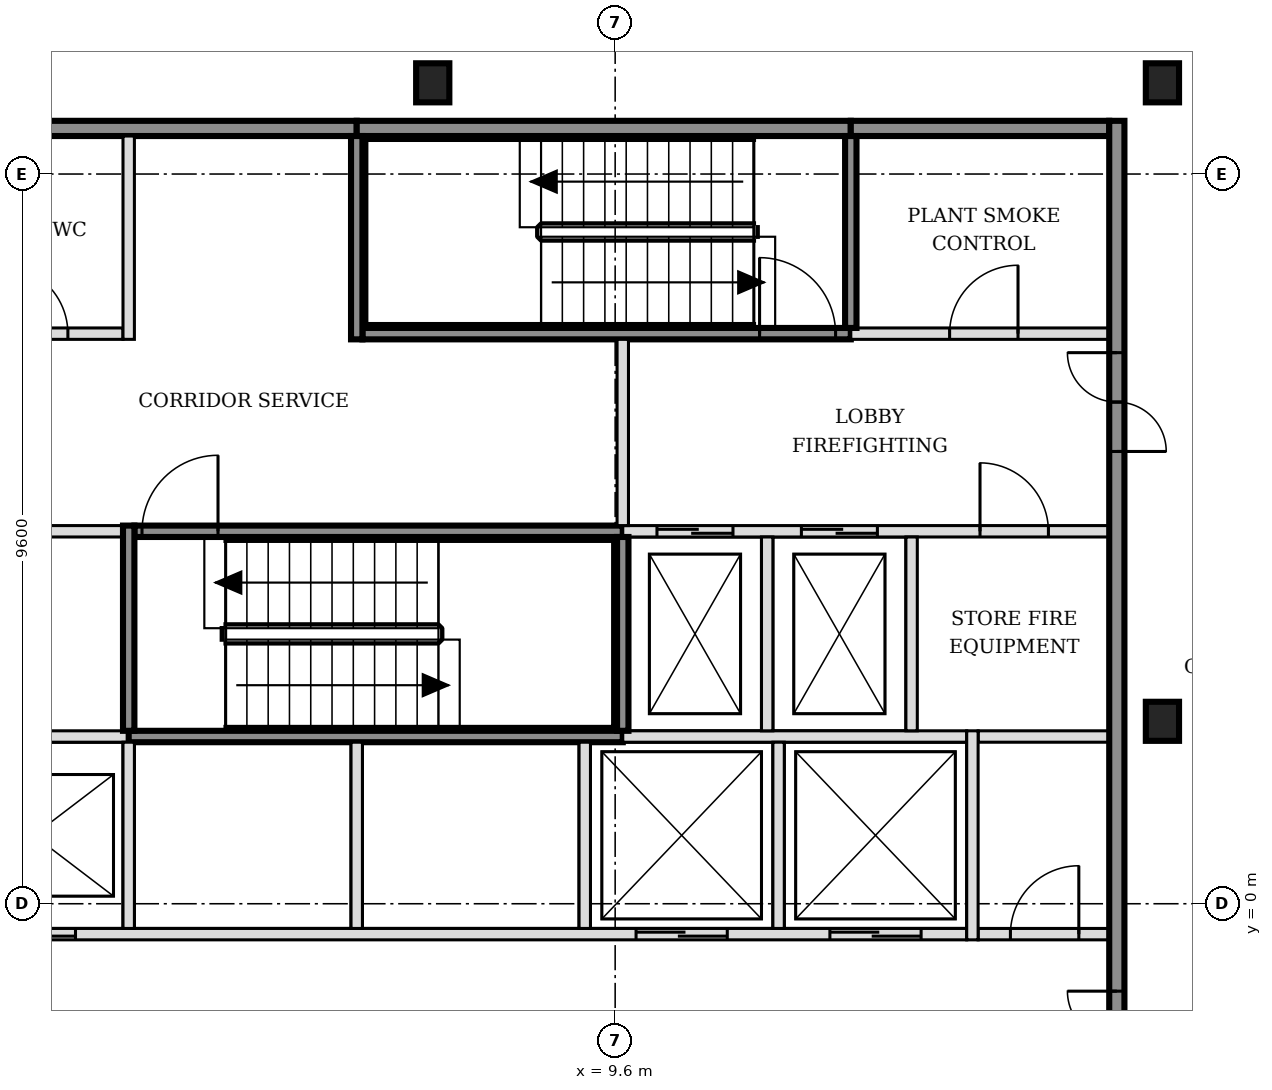
"""IFC4 building model, lengths in metres.
Left out: names, types, materials, properties, quantities, classifications, styles, units other than length and angle.
Written with IfcOpenShell. Run it as: python <this file> out.ifc"""

import sys

from ifc_helpers import new_model, si_unit, direction, frame, frame_2d, origin, origin_2d, place, context, subcontext, project, spatial, rectangle, i_section, extrude, element, fill, save


model = new_model("IFC4")
c1 = context("Model", 3, precision=1e-05, world=origin(), true_north=direction((0.0, 1.0)))
c2 = subcontext(c1, "Body", "Model", "MODEL_VIEW")
j1 = project(units=[si_unit("LENGTHUNIT", "METRE"), si_unit("PLANEANGLEUNIT", "RADIAN")], contexts=[c1])
p1 = place(None, origin())
s1 = spatial("IfcSite", under=j1, at=p1, CompositionType="ELEMENT")
p2 = place(p1, origin())
s2 = spatial("IfcBuilding", under=s1, at=p2, CompositionType="ELEMENT")
p3 = place(p2, frame((0.0, 0.0, 87.0)))
s3 = spatial("IfcBuildingStorey", under=s2, at=p3, CompositionType="ELEMENT", Elevation=87.0)
for number, where, z_axis, x_axis in (
    (1, (16.8, 2.4, -0.15), (0.0, 0.0, 1.0), (1.0, 0.0, 0.0)),
    (2, (7.2, 10.8, -0.15), (0.0, 0.0, 1.0), (1.0, 0.0, 0.0)),
    (3, (16.8, 10.8, -0.15), (0.0, 0.0, 1.0), (1.0, 0.0, 0.0)),
):
    element("IfcColumn", number, at=place(p3, frame(where, z_axis=z_axis, x_axis=x_axis)), inside=s3, PredefinedType="COLUMN", context=c2, shape_type="SweptSolid", body=[
        extrude(i_section(OverallWidth=0.437, OverallDepth=0.514, WebThickness=0.061, FlangeThickness=0.097, FilletRadius=0.015, at=origin_2d()), origin(), (0.0, 0.0, 1.0), 3.6),
    ])
p4 = place(p3, frame((-1.7, -0.4, 0.0), z_axis=(0.0, 0.0, 1.0), x_axis=(1.0, 0.0, 0.0)))
e4 = element("IfcWall", 4, at=p4, inside=s3, PredefinedType="SOLIDWALL", context=c2, shape_type="SweptSolid", body=[
    extrude(rectangle(XDim=15.925, YDim=0.15, at=frame_2d((7.962, 0.0))), origin(), (0.0, 0.0, 1.0), 3.45),
])
p5 = place(p4, frame((0.6, 0.0, 0.0)))
e5 = element("IfcOpeningElement", 5, at=p5, cuts=e4, PredefinedType="OPENING", context=c2, shape_type="SweptSolid", body=[
    extrude(rectangle(XDim=1.1, YDim=2.1, at=frame_2d((0.55, 1.05))), frame((0.0, 0.085, 0.0), z_axis=(0.0, -1.0, 0.0), x_axis=(1.0, 0.0, 0.0)), (0.0, 0.0, 1.0), 0.17),
])
p6 = place(p4, frame((3.1, 0.0, 0.0)))
e6 = element("IfcOpeningElement", 6, at=p6, cuts=e4, PredefinedType="OPENING", context=c2, shape_type="SweptSolid", body=[
    extrude(rectangle(XDim=1.1, YDim=2.1, at=frame_2d((0.55, 1.05))), frame((0.0, 0.085, 0.0), z_axis=(0.0, -1.0, 0.0), x_axis=(1.0, 0.0, 0.0)), (0.0, 0.0, 1.0), 0.17),
])
p7 = place(p4, frame((11.575, 0.0, 0.0)))
e7 = element("IfcOpeningElement", 7, at=p7, cuts=e4, PredefinedType="OPENING", context=c2, shape_type="SweptSolid", body=[
    extrude(rectangle(XDim=1.2, YDim=2.1, at=frame_2d((0.6, 1.05))), frame((0.0, 0.085, 0.0), z_axis=(0.0, -1.0, 0.0), x_axis=(1.0, 0.0, 0.0)), (0.0, 0.0, 1.0), 0.17),
])
p8 = place(p4, frame((14.125, 0.0, 0.0)))
e8 = element("IfcOpeningElement", 8, at=p8, cuts=e4, PredefinedType="OPENING", context=c2, shape_type="SweptSolid", body=[
    extrude(rectangle(XDim=1.2, YDim=2.1, at=frame_2d((0.6, 1.05))), frame((0.0, 0.085, 0.0), z_axis=(0.0, -1.0, 0.0), x_axis=(1.0, 0.0, 0.0)), (0.0, 0.0, 1.0), 0.17),
])
p9 = place(p3, frame((14.375, -0.4, 0.0), z_axis=(0.0, 0.0, 1.0), x_axis=(1.0, 0.0, 0.0)))
e9 = element("IfcWall", 9, at=p9, inside=s3, PredefinedType="PARTITIONING", context=c2, shape_type="SweptSolid", body=[
    extrude(rectangle(XDim=1.725, YDim=0.15, at=frame_2d((0.863, 0.0))), origin(), (0.0, 0.0, 1.0), 3.45),
])
p10 = place(p9, frame((0.425, 0.0, 0.0)))
e10 = element("IfcOpeningElement", 10, at=p10, cuts=e9, PredefinedType="OPENING", context=c2, shape_type="SweptSolid", body=[
    extrude(rectangle(XDim=0.9, YDim=2.1, at=frame_2d((0.45, 1.05))), frame((0.0, 0.085, 0.0), z_axis=(0.0, -1.0, 0.0), x_axis=(1.0, 0.0, 0.0)), (0.0, 0.0, 1.0), 0.17),
])
p11 = place(p3, frame((-1.7, 2.2, 0.0), z_axis=(0.0, 0.0, 1.0), x_axis=(1.0, 0.0, 0.0)))
e11 = element("IfcWall", 11, at=p11, inside=s3, PredefinedType="SOLIDWALL", context=c2, shape_type="SweptSolid", body=[
    extrude(rectangle(XDim=4.9, YDim=0.15, at=frame_2d((2.45, 0.0))), origin(), (0.0, 0.0, 1.0), 3.45),
])
p12 = place(p3, frame((3.2, 2.2, 0.0), z_axis=(0.0, 0.0, 1.0), x_axis=(1.0, 0.0, 0.0)))
e12 = element("IfcWall", 12, at=p12, inside=s3, PredefinedType="SOLIDWALL", context=c2, shape_type="SweptSolid", body=[
    extrude(rectangle(XDim=6.5, YDim=0.15, at=frame_2d((3.25, 0.0))), origin(), (0.0, 0.0, 1.0), 3.45),
])
p13 = place(p3, frame((9.7, 2.2, 0.0), z_axis=(0.0, 0.0, 1.0), x_axis=(1.0, 0.0, 0.0)))
e13 = element("IfcWall", 13, at=p13, inside=s3, PredefinedType="SOLIDWALL", context=c2, shape_type="SweptSolid", body=[
    extrude(rectangle(XDim=4.525, YDim=0.15, at=frame_2d((2.263, 0.0))), origin(), (0.0, 0.0, 1.0), 3.45),
])
p14 = place(p3, frame((14.375, 2.2, 0.0), z_axis=(0.0, 0.0, 1.0), x_axis=(1.0, 0.0, 0.0)))
e14 = element("IfcWall", 14, at=p14, inside=s3, PredefinedType="PARTITIONING", context=c2, shape_type="SweptSolid", body=[
    extrude(rectangle(XDim=1.725, YDim=0.15, at=frame_2d((0.863, 0.0))), origin(), (0.0, 0.0, 1.0), 3.45),
])
p15 = place(p3, frame((-1.7, 4.9, 0.0), z_axis=(0.0, 0.0, 1.0), x_axis=(1.0, 0.0, 0.0)))
e15 = element("IfcWall", 15, at=p15, inside=s3, PredefinedType="PARTITIONING", context=c2, shape_type="SweptSolid", body=[
    extrude(rectangle(XDim=4.825, YDim=0.15, at=frame_2d((2.413, 0.0))), origin(), (0.0, 0.0, 1.0), 3.45),
])
p16 = place(p15, frame((1.95, 0.0, 0.0)))
e16 = element("IfcOpeningElement", 16, at=p16, cuts=e15, PredefinedType="OPENING", context=c2, shape_type="SweptSolid", body=[
    extrude(rectangle(XDim=0.9, YDim=2.1, at=frame_2d((0.45, 1.05))), frame((0.0, 0.085, 0.0), z_axis=(0.0, -1.0, 0.0), x_axis=(1.0, 0.0, 0.0)), (0.0, 0.0, 1.0), 0.17),
])
p17 = place(p3, frame((3.275, 4.9, 0.0), z_axis=(0.0, 0.0, 1.0), x_axis=(1.0, 0.0, 0.0)))
e17 = element("IfcWall", 17, at=p17, inside=s3, PredefinedType="SOLIDWALL", context=c2, shape_type="SweptSolid", body=[
    extrude(rectangle(XDim=6.425, YDim=0.15, at=frame_2d((3.212, 0.0))), origin(), (0.0, 0.0, 1.0), 3.45),
])
p18 = place(p17, frame((0.1, 0.0, 0.0)))
e18 = element("IfcOpeningElement", 18, at=p18, cuts=e17, PredefinedType="OPENING", context=c2, shape_type="SweptSolid", body=[
    extrude(rectangle(XDim=1.0, YDim=2.1, at=frame_2d((0.5, 1.05))), frame((0.0, 0.085, 0.0), z_axis=(0.0, -1.0, 0.0), x_axis=(1.0, 0.0, 0.0)), (0.0, 0.0, 1.0), 0.17),
])
p19 = place(p3, frame((9.7, 4.9, 0.0), z_axis=(0.0, 0.0, 1.0), x_axis=(1.0, 0.0, 0.0)))
e19 = element("IfcWall", 19, at=p19, inside=s3, PredefinedType="SOLIDWALL", context=c2, shape_type="SweptSolid", body=[
    extrude(rectangle(XDim=6.4, YDim=0.15, at=frame_2d((3.2, 0.0))), origin(), (0.0, 0.0, 1.0), 3.45),
])
p20 = place(p19, frame((0.45, 0.0, 0.0)))
e20 = element("IfcOpeningElement", 20, at=p20, cuts=e19, PredefinedType="OPENING", context=c2, shape_type="SweptSolid", body=[
    extrude(rectangle(XDim=1.0, YDim=2.1, at=frame_2d((0.5, 1.05))), frame((0.0, 0.085, 0.0), z_axis=(0.0, -1.0, 0.0), x_axis=(1.0, 0.0, 0.0)), (0.0, 0.0, 1.0), 0.17),
])
p21 = place(p19, frame((2.35, 0.0, 0.0)))
e21 = element("IfcOpeningElement", 21, at=p21, cuts=e19, PredefinedType="OPENING", context=c2, shape_type="SweptSolid", body=[
    extrude(rectangle(XDim=1.0, YDim=2.1, at=frame_2d((0.5, 1.05))), frame((0.0, 0.085, 0.0), z_axis=(0.0, -1.0, 0.0), x_axis=(1.0, 0.0, 0.0)), (0.0, 0.0, 1.0), 0.17),
])
p22 = place(p19, frame((4.7, 0.0, 0.0)))
e22 = element("IfcOpeningElement", 22, at=p22, cuts=e19, PredefinedType="OPENING", context=c2, shape_type="SweptSolid", body=[
    extrude(rectangle(XDim=0.9, YDim=2.1, at=frame_2d((0.45, 1.05))), frame((0.0, 0.085, 0.0), z_axis=(0.0, -1.0, 0.0), x_axis=(1.0, 0.0, 0.0)), (0.0, 0.0, 1.0), 0.17),
])
p23 = place(p3, frame((-1.7, 7.5, 0.0), z_axis=(0.0, 0.0, 1.0), x_axis=(1.0, 0.0, 0.0)))
e23 = element("IfcWall", 23, at=p23, inside=s3, PredefinedType="PARTITIONING", context=c2, shape_type="SweptSolid", body=[
    extrude(rectangle(XDim=4.825, YDim=0.15, at=frame_2d((2.413, 0.0))), origin(), (0.0, 0.0, 1.0), 3.45),
])
p24 = place(p23, frame((0.7, 0.0, 0.0)))
e24 = element("IfcOpeningElement", 24, at=p24, cuts=e23, PredefinedType="OPENING", context=c2, shape_type="SweptSolid", body=[
    extrude(rectangle(XDim=0.9, YDim=2.1, at=frame_2d((0.45, 1.05))), frame((0.0, 0.085, 0.0), z_axis=(0.0, -1.0, 0.0), x_axis=(1.0, 0.0, 0.0)), (0.0, 0.0, 1.0), 0.17),
])
p25 = place(p23, frame((3.2, 0.0, 0.0)))
e25 = element("IfcOpeningElement", 25, at=p25, cuts=e23, PredefinedType="OPENING", context=c2, shape_type="SweptSolid", body=[
    extrude(rectangle(XDim=0.9, YDim=2.1, at=frame_2d((0.45, 1.05))), frame((0.0, 0.085, 0.0), z_axis=(0.0, -1.0, 0.0), x_axis=(1.0, 0.0, 0.0)), (0.0, 0.0, 1.0), 0.17),
])
p26 = place(p3, frame((6.275, 7.5, 0.0), z_axis=(0.0, 0.0, 1.0), x_axis=(1.0, 0.0, 0.0)))
e26 = element("IfcWall", 26, at=p26, inside=s3, PredefinedType="SOLIDWALL", context=c2, shape_type="SweptSolid", body=[
    extrude(rectangle(XDim=6.425, YDim=0.15, at=frame_2d((3.212, 0.0))), origin(), (0.0, 0.0, 1.0), 3.45),
])
p27 = place(p26, frame((5.225, 0.0, 0.0)))
e27 = element("IfcOpeningElement", 27, at=p27, cuts=e26, PredefinedType="OPENING", context=c2, shape_type="SweptSolid", body=[
    extrude(rectangle(XDim=1.0, YDim=2.1, at=frame_2d((0.5, 1.05))), frame((0.0, 0.085, 0.0), z_axis=(0.0, -1.0, 0.0), x_axis=(1.0, 0.0, 0.0)), (0.0, 0.0, 1.0), 0.17),
])
p28 = place(p3, frame((12.7, 7.5, 0.0), z_axis=(0.0, 0.0, 1.0), x_axis=(1.0, 0.0, 0.0)))
e28 = element("IfcWall", 28, at=p28, inside=s3, PredefinedType="SOLIDWALL", context=c2, shape_type="SweptSolid", body=[
    extrude(rectangle(XDim=3.4, YDim=0.15, at=frame_2d((1.7, 0.0))), origin(), (0.0, 0.0, 1.0), 3.45),
])
p29 = place(p28, frame((1.3, 0.0, 0.0)))
e29 = element("IfcOpeningElement", 29, at=p29, cuts=e28, PredefinedType="OPENING", context=c2, shape_type="SweptSolid", body=[
    extrude(rectangle(XDim=0.9, YDim=2.1, at=frame_2d((0.45, 1.05))), frame((0.0, 0.085, 0.0), z_axis=(0.0, -1.0, 0.0), x_axis=(1.0, 0.0, 0.0)), (0.0, 0.0, 1.0), 0.17),
])
p30 = place(p3, frame((-1.7, 10.2, 0.0), z_axis=(0.0, 0.0, 1.0), x_axis=(1.0, 0.0, 0.0)))
e30 = element("IfcWall", 30, at=p30, inside=s3, PredefinedType="SOLIDWALL", context=c2, shape_type="SweptSolid", body=[
    extrude(rectangle(XDim=7.9, YDim=0.2, at=frame_2d((3.95, 0.0))), origin(), (0.0, 0.0, 1.0), 3.45),
])
p31 = place(p3, frame((6.2, 10.2, 0.0), z_axis=(0.0, 0.0, 1.0), x_axis=(1.0, 0.0, 0.0)))
e31 = element("IfcWall", 31, at=p31, inside=s3, PredefinedType="SOLIDWALL", context=c2, shape_type="SweptSolid", body=[
    extrude(rectangle(XDim=6.5, YDim=0.2, at=frame_2d((3.25, 0.0))), origin(), (0.0, 0.0, 1.0), 3.45),
])
p32 = place(p3, frame((12.7, 10.2, 0.0), z_axis=(0.0, 0.0, 1.0), x_axis=(1.0, 0.0, 0.0)))
e32 = element("IfcWall", 32, at=p32, inside=s3, PredefinedType="SOLIDWALL", context=c2, shape_type="SweptSolid", body=[
    extrude(rectangle(XDim=3.4, YDim=0.2, at=frame_2d((1.7, 0.0))), origin(), (0.0, 0.0, 1.0), 3.45),
])
p33 = place(p3, frame((3.2, -0.325, 0.0), z_axis=(0.0, 0.0, 1.0), x_axis=(0.0, 1.0, 0.0)))
e33 = element("IfcWall", 33, at=p33, inside=s3, PredefinedType="SOLIDWALL", context=c2, shape_type="SweptSolid", body=[
    extrude(rectangle(XDim=2.45, YDim=0.15, at=frame_2d((1.225, 0.0))), origin(), (0.0, 0.0, 1.0), 3.45),
])
p34 = place(p3, frame((3.2, 2.275, 0.0), z_axis=(0.0, 0.0, 1.0), x_axis=(0.0, 1.0, 0.0)))
e34 = element("IfcWall", 34, at=p34, inside=s3, PredefinedType="SOLIDWALL", context=c2, shape_type="SweptSolid", body=[
    extrude(rectangle(XDim=2.7, YDim=0.15, at=frame_2d((1.35, 0.0))), origin(), (0.0, 0.0, 1.0), 3.45),
])
p35 = place(p3, frame((3.2, 7.425, 0.0), z_axis=(0.0, 0.0, 1.0), x_axis=(0.0, 1.0, 0.0)))
e35 = element("IfcWall", 35, at=p35, inside=s3, PredefinedType="PARTITIONING", context=c2, shape_type="SweptSolid", body=[
    extrude(rectangle(XDim=2.675, YDim=0.15, at=frame_2d((1.337, 0.0))), origin(), (0.0, 0.0, 1.0), 3.45),
])
p36 = place(p3, frame((6.2, -0.325, 0.0), z_axis=(0.0, 0.0, 1.0), x_axis=(0.0, 1.0, 0.0)))
e36 = element("IfcWall", 36, at=p36, inside=s3, PredefinedType="SOLIDWALL", context=c2, shape_type="SweptSolid", body=[
    extrude(rectangle(XDim=2.45, YDim=0.15, at=frame_2d((1.225, 0.0))), origin(), (0.0, 0.0, 1.0), 3.45),
])
p37 = place(p3, frame((6.2, 7.425, 0.0), z_axis=(0.0, 0.0, 1.0), x_axis=(0.0, 1.0, 0.0)))
e37 = element("IfcWall", 37, at=p37, inside=s3, PredefinedType="SOLIDWALL", context=c2, shape_type="SweptSolid", body=[
    extrude(rectangle(XDim=2.675, YDim=0.15, at=frame_2d((1.337, 0.0))), origin(), (0.0, 0.0, 1.0), 3.45),
])
p38 = place(p3, frame((9.2, -0.325, 0.0), z_axis=(0.0, 0.0, 1.0), x_axis=(0.0, 1.0, 0.0)))
e38 = element("IfcWall", 38, at=p38, inside=s3, PredefinedType="SOLIDWALL", context=c2, shape_type="SweptSolid", body=[
    extrude(rectangle(XDim=2.45, YDim=0.15, at=frame_2d((1.225, 0.0))), origin(), (0.0, 0.0, 1.0), 3.45),
])
p39 = place(p3, frame((9.7, 2.275, 0.0), z_axis=(0.0, 0.0, 1.0), x_axis=(0.0, 1.0, 0.0)))
e39 = element("IfcWall", 39, at=p39, inside=s3, PredefinedType="SOLIDWALL", context=c2, shape_type="SweptSolid", body=[
    extrude(rectangle(XDim=2.55, YDim=0.15, at=frame_2d((1.275, 0.0))), origin(), (0.0, 0.0, 1.0), 3.45),
])
p40 = place(p3, frame((9.7, 4.975, 0.0), z_axis=(0.0, 0.0, 1.0), x_axis=(0.0, 1.0, 0.0)))
e40 = element("IfcWall", 40, at=p40, inside=s3, PredefinedType="SOLIDWALL", context=c2, shape_type="SweptSolid", body=[
    extrude(rectangle(XDim=2.45, YDim=0.15, at=frame_2d((1.225, 0.0))), origin(), (0.0, 0.0, 1.0), 3.45),
])
p41 = place(p3, frame((11.6, 2.275, 0.0), z_axis=(0.0, 0.0, 1.0), x_axis=(0.0, 1.0, 0.0)))
e41 = element("IfcWall", 41, at=p41, inside=s3, PredefinedType="SOLIDWALL", context=c2, shape_type="SweptSolid", body=[
    extrude(rectangle(XDim=2.55, YDim=0.15, at=frame_2d((1.275, 0.0))), origin(), (0.0, 0.0, 1.0), 3.45),
])
p42 = place(p3, frame((11.75, -0.325, 0.0), z_axis=(0.0, 0.0, 1.0), x_axis=(0.0, 1.0, 0.0)))
e42 = element("IfcWall", 42, at=p42, inside=s3, PredefinedType="SOLIDWALL", context=c2, shape_type="SweptSolid", body=[
    extrude(rectangle(XDim=2.45, YDim=0.15, at=frame_2d((1.225, 0.0))), origin(), (0.0, 0.0, 1.0), 3.45),
])
p43 = place(p3, frame((12.7, 7.575, 0.0), z_axis=(0.0, 0.0, 1.0), x_axis=(0.0, 1.0, 0.0)))
e43 = element("IfcWall", 43, at=p43, inside=s3, PredefinedType="SOLIDWALL", context=c2, shape_type="SweptSolid", body=[
    extrude(rectangle(XDim=2.525, YDim=0.15, at=frame_2d((1.263, 0.0))), origin(), (0.0, 0.0, 1.0), 3.45),
])
p44 = place(p3, frame((13.5, 2.275, 0.0), z_axis=(0.0, 0.0, 1.0), x_axis=(0.0, 1.0, 0.0)))
e44 = element("IfcWall", 44, at=p44, inside=s3, PredefinedType="SOLIDWALL", context=c2, shape_type="SweptSolid", body=[
    extrude(rectangle(XDim=2.55, YDim=0.15, at=frame_2d((1.275, 0.0))), origin(), (0.0, 0.0, 1.0), 3.45),
])
p45 = place(p3, frame((14.3, -0.475, 0.0), z_axis=(0.0, 0.0, 1.0), x_axis=(0.0, 1.0, 0.0)))
e45 = element("IfcWall", 45, at=p45, inside=s3, PredefinedType="SOLIDWALL", context=c2, shape_type="SweptSolid", body=[
    extrude(rectangle(XDim=2.75, YDim=0.15, at=frame_2d((1.375, 0.0))), origin(), (0.0, 0.0, 1.0), 3.45),
])
p46 = place(p3, frame((16.2, -5.5, 0.0), z_axis=(0.0, 0.0, 1.0), x_axis=(0.0, 1.0, 0.0)))
e46 = element("IfcWall", 46, at=p46, inside=s3, PredefinedType="SOLIDWALL", context=c2, shape_type="SweptSolid", body=[
    extrude(rectangle(XDim=15.8, YDim=0.2, at=frame_2d((7.9, 0.0))), origin(), (0.0, 0.0, 1.0), 3.45),
])
p47 = place(p46, frame((3.05, 0.0, 0.0)))
e47 = element("IfcOpeningElement", 47, at=p47, cuts=e46, PredefinedType="OPENING", context=c2, shape_type="SweptSolid", body=[
    extrude(rectangle(XDim=1.3, YDim=2.1, at=frame_2d((0.65, 1.05))), frame((0.0, 0.11, 0.0), z_axis=(0.0, -1.0, 0.0), x_axis=(1.0, 0.0, 0.0)), (0.0, 0.0, 1.0), 0.22),
])
p48 = place(p46, frame((11.45, 0.0, 0.0)))
e48 = element("IfcOpeningElement", 48, at=p48, cuts=e46, PredefinedType="OPENING", context=c2, shape_type="SweptSolid", body=[
    extrude(rectangle(XDim=1.3, YDim=2.1, at=frame_2d((0.65, 1.05))), frame((0.0, 0.11, 0.0), z_axis=(0.0, -1.0, 0.0), x_axis=(1.0, 0.0, 0.0)), (0.0, 0.0, 1.0), 0.22),
])
p49 = place(p6, origin())
e49 = element("IfcDoor", 49, at=p49, inside=s3, OperationType="DOUBLE_DOOR_SLIDING", PredefinedType="DOOR", context=c2, shape_type="SweptSolid", body=[
    extrude(rectangle(XDim=1.1, YDim=2.1, at=frame_2d((0.55, 1.05))), frame((0.0, 0.025, 0.0), z_axis=(0.0, -1.0, 0.0), x_axis=(1.0, 0.0, 0.0)), (0.0, 0.0, 1.0), 0.05),
])
fill(e6, e49)
p50 = place(p7, origin())
e50 = element("IfcDoor", 50, at=p50, inside=s3, OperationType="DOUBLE_DOOR_SLIDING", PredefinedType="DOOR", context=c2, shape_type="SweptSolid", body=[
    extrude(rectangle(XDim=1.2, YDim=2.1, at=frame_2d((0.6, 1.05))), frame((0.0, 0.025, 0.0), z_axis=(0.0, -1.0, 0.0), x_axis=(1.0, 0.0, 0.0)), (0.0, 0.0, 1.0), 0.05),
])
fill(e7, e50)
p51 = place(p8, origin())
e51 = element("IfcDoor", 51, at=p51, inside=s3, OperationType="DOUBLE_DOOR_SLIDING", PredefinedType="DOOR", context=c2, shape_type="SweptSolid", body=[
    extrude(rectangle(XDim=1.2, YDim=2.1, at=frame_2d((0.6, 1.05))), frame((0.0, 0.025, 0.0), z_axis=(0.0, -1.0, 0.0), x_axis=(1.0, 0.0, 0.0)), (0.0, 0.0, 1.0), 0.05),
])
fill(e8, e51)
p52 = place(p20, origin())
e52 = element("IfcDoor", 52, at=p52, inside=s3, OperationType="DOUBLE_DOOR_SLIDING", PredefinedType="DOOR", context=c2, shape_type="SweptSolid", body=[
    extrude(rectangle(XDim=1.0, YDim=2.1, at=frame_2d((0.5, 1.05))), frame((0.0, 0.025, 0.0), z_axis=(0.0, -1.0, 0.0), x_axis=(1.0, 0.0, 0.0)), (0.0, 0.0, 1.0), 0.05),
])
fill(e20, e52)
p53 = place(p21, origin())
e53 = element("IfcDoor", 53, at=p53, inside=s3, OperationType="DOUBLE_DOOR_SLIDING", PredefinedType="DOOR", context=c2, shape_type="SweptSolid", body=[
    extrude(rectangle(XDim=1.0, YDim=2.1, at=frame_2d((0.5, 1.05))), frame((0.0, 0.025, 0.0), z_axis=(0.0, -1.0, 0.0), x_axis=(1.0, 0.0, 0.0)), (0.0, 0.0, 1.0), 0.05),
])
fill(e21, e53)
p54 = place(p18, origin())
e54 = element("IfcDoor", 54, at=p54, inside=s3, OperationType="SINGLE_SWING_RIGHT", PredefinedType="DOOR", context=c2, shape_type="SweptSolid", body=[
    extrude(rectangle(XDim=1.0, YDim=2.1, at=frame_2d((0.5, 1.05))), frame((0.0, 0.025, 0.0), z_axis=(0.0, -1.0, 0.0), x_axis=(1.0, 0.0, 0.0)), (0.0, 0.0, 1.0), 0.05),
])
fill(e18, e54)
p55 = place(p27, origin())
e55 = element("IfcDoor", 55, at=p55, inside=s3, OperationType="SINGLE_SWING_LEFT", PredefinedType="DOOR", context=c2, shape_type="SweptSolid", body=[
    extrude(rectangle(XDim=1.0, YDim=2.1, at=frame_2d((0.5, 1.05))), frame((0.0, 0.025, 0.0), z_axis=(0.0, -1.0, 0.0), x_axis=(1.0, 0.0, 0.0)), (0.0, 0.0, 1.0), 0.05),
])
fill(e27, e55)
p56 = place(p47, origin())
e56 = element("IfcDoor", 56, at=p56, inside=s3, OperationType="DOUBLE_DOOR_SINGLE_SWING", PredefinedType="DOOR", context=c2, shape_type="SweptSolid", body=[
    extrude(rectangle(XDim=1.3, YDim=2.1, at=frame_2d((0.65, 1.05))), frame((0.0, 0.025, 0.0), z_axis=(0.0, -1.0, 0.0), x_axis=(1.0, 0.0, 0.0)), (0.0, 0.0, 1.0), 0.05),
])
fill(e47, e56)
p57 = place(p48, origin())
e57 = element("IfcDoor", 57, at=p57, inside=s3, OperationType="DOUBLE_DOOR_SINGLE_SWING", PredefinedType="DOOR", context=c2, shape_type="SweptSolid", body=[
    extrude(rectangle(XDim=1.3, YDim=2.1, at=frame_2d((0.65, 1.05))), frame((0.0, 0.025, 0.0), z_axis=(0.0, -1.0, 0.0), x_axis=(1.0, 0.0, 0.0)), (0.0, 0.0, 1.0), 0.05),
])
fill(e48, e57)
p58 = place(p10, origin())
e58 = element("IfcDoor", 58, at=p58, inside=s3, OperationType="SINGLE_SWING_RIGHT", PredefinedType="DOOR", context=c2, shape_type="SweptSolid", body=[
    extrude(rectangle(XDim=0.9, YDim=2.1, at=frame_2d((0.45, 1.05))), frame((0.0, 0.025, 0.0), z_axis=(0.0, -1.0, 0.0), x_axis=(1.0, 0.0, 0.0)), (0.0, 0.0, 1.0), 0.05),
])
fill(e10, e58)
p59 = place(p22, origin())
e59 = element("IfcDoor", 59, at=p59, inside=s3, OperationType="SINGLE_SWING_LEFT", PredefinedType="DOOR", context=c2, shape_type="SweptSolid", body=[
    extrude(rectangle(XDim=0.9, YDim=2.1, at=frame_2d((0.45, 1.05))), frame((0.0, 0.025, 0.0), z_axis=(0.0, -1.0, 0.0), x_axis=(1.0, 0.0, 0.0)), (0.0, 0.0, 1.0), 0.05),
])
fill(e22, e59)
p60 = place(p29, origin())
e60 = element("IfcDoor", 60, at=p60, inside=s3, OperationType="SINGLE_SWING_RIGHT", PredefinedType="DOOR", context=c2, shape_type="SweptSolid", body=[
    extrude(rectangle(XDim=0.9, YDim=2.1, at=frame_2d((0.45, 1.05))), frame((0.0, 0.025, 0.0), z_axis=(0.0, -1.0, 0.0), x_axis=(1.0, 0.0, 0.0)), (0.0, 0.0, 1.0), 0.05),
])
fill(e29, e60)
p61 = place(p25, origin())
e61 = element("IfcDoor", 61, at=p61, inside=s3, OperationType="SINGLE_SWING_LEFT", PredefinedType="DOOR", context=c2, shape_type="SweptSolid", body=[
    extrude(rectangle(XDim=0.9, YDim=2.1, at=frame_2d((0.45, 1.05))), frame((0.0, 0.025, 0.0), z_axis=(0.0, -1.0, 0.0), x_axis=(1.0, 0.0, 0.0)), (0.0, 0.0, 1.0), 0.05),
])
fill(e25, e61)
save(model, sys.argv[1])
